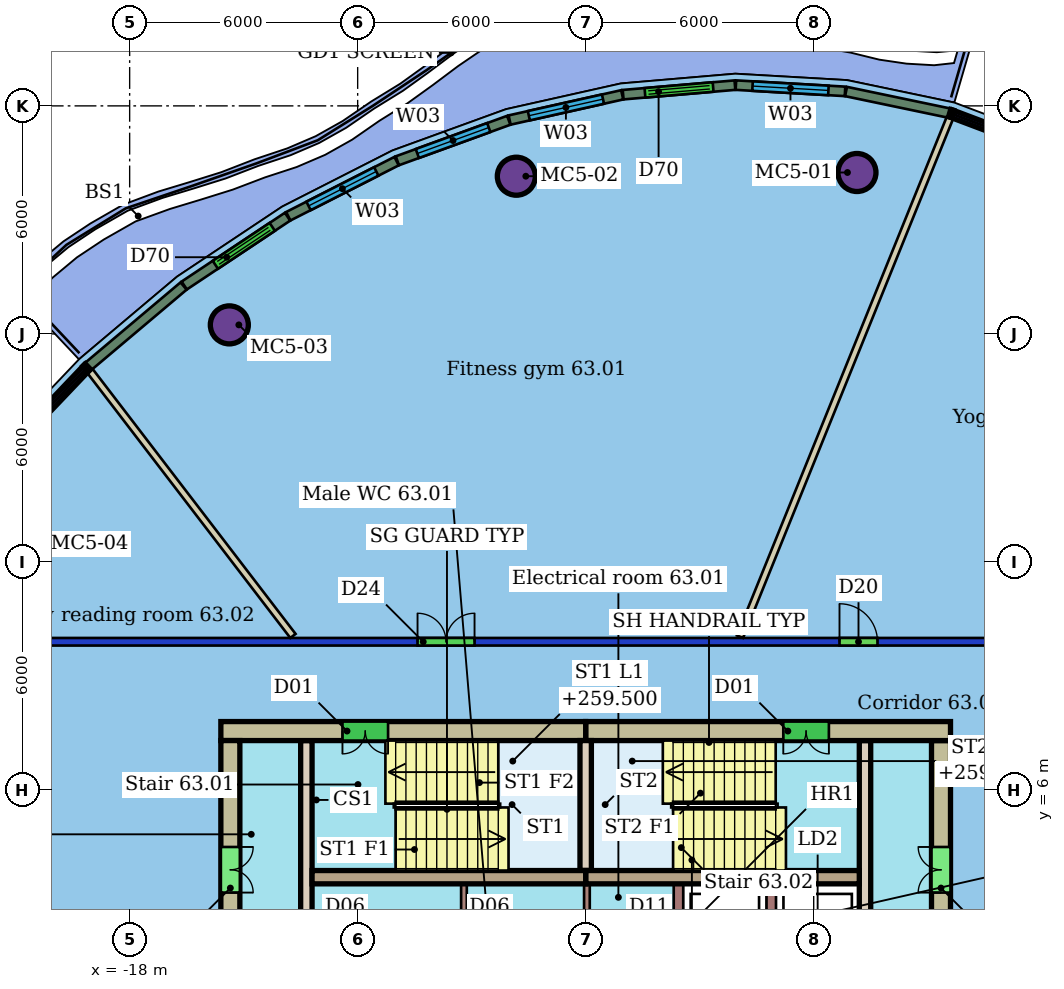
"""IFC4 building model, lengths in metres.
Left out: names, types, materials, properties, quantities, classifications, styles, units other than length and angle.
Written with IfcOpenShell. Run it as: python <this file> out.ifc"""

import sys

from ifc_helpers import new_model, si_unit, direction, frame, frame_2d, origin, origin_2d, place, context, subcontext, project, spatial, rectangle, hollow_circle, extrude, element, fill, save


model = new_model("IFC4")
c1 = context("Model", 3, precision=1e-05, world=origin(), true_north=direction((0.0, 1.0)))
c2 = subcontext(c1, "Body", "Model", "MODEL_VIEW")
j1 = project(units=[si_unit("LENGTHUNIT", "METRE"), si_unit("PLANEANGLEUNIT", "RADIAN")], contexts=[c1])
p1 = place(None, origin())
s1 = spatial("IfcSite", under=j1, at=p1, CompositionType="ELEMENT")
p2 = place(p1, origin())
s2 = spatial("IfcBuilding", under=s1, at=p2, CompositionType="ELEMENT")
p3 = place(p2, frame((0.0, 0.0, 257.7)))
s3 = spatial("IfcBuildingStorey", under=s2, at=p3, CompositionType="ELEMENT", Elevation=257.7)
for number, where, z_axis, x_axis in (
    (1, (1.138, 22.247, 0.0), (0.0, 0.0, 1.0), (1.0, 0.0, 0.0)),
    (2, (-7.825, 22.149, 0.0), (0.0, 0.0, 1.0), (1.0, 0.0, 0.0)),
    (3, (-15.377, 18.238, 0.0), (0.0, 0.0, 1.0), (1.0, 0.0, 0.0)),
):
    element("IfcColumn", number, at=place(p3, frame(where, z_axis=z_axis, x_axis=x_axis)), inside=s3, PredefinedType="COLUMN", context=c2, shape_type="SweptSolid", body=[
        extrude(hollow_circle(Radius=0.5, WallThickness=0.04, at=origin_2d()), origin(), (0.0, 0.0, 1.0), 3.45),
    ])
p4 = place(p3, frame((-20.4, 9.9, 0.0), z_axis=(0.0, 0.0, 1.0), x_axis=(1.0, 0.0, 0.0)))
e4 = element("IfcWall", 4, at=p4, inside=s3, PredefinedType="PARTITIONING", context=c2, shape_type="SweptSolid", body=[
    extrude(rectangle(XDim=28.8, YDim=0.2, at=frame_2d((14.4, 0.0))), origin(), (0.0, 0.0, 1.0), 3.1),
])
p5 = place(p4, frame((9.976, 0.0, 0.0)))
e5 = element("IfcOpeningElement", 5, at=p5, cuts=e4, PredefinedType="OPENING", context=c2, shape_type="SweptSolid", body=[
    extrude(rectangle(XDim=1.5, YDim=2.1, at=frame_2d((0.75, 1.05))), frame((0.0, 0.11, 0.0), z_axis=(0.0, -1.0, 0.0), x_axis=(1.0, 0.0, 0.0)), (0.0, 0.0, 1.0), 0.22),
])
p6 = place(p4, frame((21.079, 0.0, 0.0)))
e6 = element("IfcOpeningElement", 6, at=p6, cuts=e4, PredefinedType="OPENING", context=c2, shape_type="SweptSolid", body=[
    extrude(rectangle(XDim=1.0, YDim=2.1, at=frame_2d((0.5, 1.05))), frame((0.0, 0.11, 0.0), z_axis=(0.0, -1.0, 0.0), x_axis=(1.0, 0.0, 0.0)), (0.0, 0.0, 1.0), 0.22),
])
p7 = place(p3, frame((3.582, 23.679, 0.0), z_axis=(0.0, 0.0, 1.0), x_axis=(-0.375113366442, -0.926978943837, 0.0)))
e7 = element("IfcWall", 7, at=p7, inside=s3, PredefinedType="PARTITIONING", context=c2, shape_type="SweptSolid", body=[
    extrude(rectangle(XDim=14.721, YDim=0.175, at=frame_2d((7.361, 0.0))), origin(), (0.0, 0.0, 1.0), 3.45),
])
p8 = place(p3, frame((-19.042, 17.022, 0.0), z_axis=(0.0, 0.0, 1.0), x_axis=(0.608204407096, -0.793780447724, 0.0)))
e8 = element("IfcWall", 8, at=p8, inside=s3, PredefinedType="PARTITIONING", context=c2, shape_type="SweptSolid", body=[
    extrude(rectangle(XDim=8.779, YDim=0.175, at=frame_2d((4.389, 0.0))), origin(), (0.0, 0.0, 1.0), 3.45),
])
p9 = place(p3, frame((3.563, 23.811, 0.0), z_axis=(0.0, 0.0, 1.0), x_axis=(-0.978796787282, 0.20483371111, 0.0)))
e9 = element("IfcWall", 9, at=p9, inside=s3, PredefinedType="SOLIDWALL", context=c2, shape_type="SweptSolid", body=[
    extrude(rectangle(XDim=2.771, YDim=0.25, at=frame_2d((1.386, 0.0))), origin(), (0.0, 0.0, 1.0), 3.15),
])
p10 = place(p3, frame((0.824, 24.382, 0.0), z_axis=(0.0, 0.0, 1.0), x_axis=(-0.998361927318, 0.057214177282, 0.0)))
e10 = element("IfcWall", 10, at=p10, inside=s3, PredefinedType="SOLIDWALL", context=c2, shape_type="SweptSolid", body=[
    extrude(rectangle(XDim=2.876, YDim=0.25, at=frame_2d((1.438, 0.0))), origin(), (0.0, 0.0, 1.0), 3.15),
])
p11 = place(p10, frame((0.438, 0.0, 0.9)))
e11 = element("IfcOpeningElement", 11, at=p11, cuts=e10, PredefinedType="OPENING", context=c2, shape_type="SweptSolid", body=[
    extrude(rectangle(XDim=2.0, YDim=2.1, at=frame_2d((1.0, 1.05))), frame((0.0, 0.135, 0.0), z_axis=(0.0, -1.0, 0.0), x_axis=(1.0, 0.0, 0.0)), (0.0, 0.0, 1.0), 0.27),
])
p12 = place(p3, frame((-2.073, 24.546, 0.0), z_axis=(0.0, 0.0, 1.0), x_axis=(-0.996387742916, -0.084920349541, 0.0)))
e12 = element("IfcWall", 12, at=p12, inside=s3, PredefinedType="SOLIDWALL", context=c2, shape_type="SweptSolid", body=[
    extrude(rectangle(XDim=2.953, YDim=0.25, at=frame_2d((1.476, 0.0))), origin(), (0.0, 0.0, 1.0), 3.15),
])
p13 = place(p12, frame((0.576, 0.0, 0.0)))
e13 = element("IfcOpeningElement", 13, at=p13, cuts=e12, PredefinedType="OPENING", context=c2, shape_type="SweptSolid", body=[
    extrude(rectangle(XDim=1.8, YDim=2.4, at=frame_2d((0.9, 1.2))), frame((0.0, 0.135, 0.0), z_axis=(0.0, -1.0, 0.0), x_axis=(1.0, 0.0, 0.0)), (0.0, 0.0, 1.0), 0.27),
])
p14 = place(p3, frame((-5.039, 24.291, 0.0), z_axis=(0.0, 0.0, 1.0), x_axis=(-0.975828037389, -0.218539793734, 0.0)))
e14 = element("IfcWall", 14, at=p14, inside=s3, PredefinedType="SOLIDWALL", context=c2, shape_type="SweptSolid", body=[
    extrude(rectangle(XDim=3.035, YDim=0.25, at=frame_2d((1.518, 0.0))), origin(), (0.0, 0.0, 1.0), 3.15),
])
p15 = place(p14, frame((0.518, 0.0, 0.9)))
e15 = element("IfcOpeningElement", 15, at=p15, cuts=e14, PredefinedType="OPENING", context=c2, shape_type="SweptSolid", body=[
    extrude(rectangle(XDim=2.0, YDim=2.1, at=frame_2d((1.0, 1.05))), frame((0.0, 0.135, 0.0), z_axis=(0.0, -1.0, 0.0), x_axis=(1.0, 0.0, 0.0)), (0.0, 0.0, 1.0), 0.27),
])
p16 = place(p3, frame((-8.024, 23.621, 0.0), z_axis=(0.0, 0.0, 1.0), x_axis=(-0.93980485135, -0.341711634831, 0.0)))
e16 = element("IfcWall", 16, at=p16, inside=s3, PredefinedType="SOLIDWALL", context=c2, shape_type="SweptSolid", body=[
    extrude(rectangle(XDim=3.119, YDim=0.25, at=frame_2d((1.559, 0.0))), origin(), (0.0, 0.0, 1.0), 3.15),
])
p17 = place(p16, frame((0.559, 0.0, 0.9)))
e17 = element("IfcOpeningElement", 17, at=p17, cuts=e16, PredefinedType="OPENING", context=c2, shape_type="SweptSolid", body=[
    extrude(rectangle(XDim=2.0, YDim=2.1, at=frame_2d((1.0, 1.05))), frame((0.0, 0.135, 0.0), z_axis=(0.0, -1.0, 0.0), x_axis=(1.0, 0.0, 0.0)), (0.0, 0.0, 1.0), 0.27),
])
p18 = place(p3, frame((-10.977, 22.546, 0.0), z_axis=(0.0, 0.0, 1.0), x_axis=(-0.891165922341, -0.453677527389, 0.0)))
e18 = element("IfcWall", 18, at=p18, inside=s3, PredefinedType="SOLIDWALL", context=c2, shape_type="SweptSolid", body=[
    extrude(rectangle(XDim=3.197, YDim=0.25, at=frame_2d((1.599, 0.0))), origin(), (0.0, 0.0, 1.0), 3.15),
])
p19 = place(p18, frame((0.599, 0.0, 0.9)))
e19 = element("IfcOpeningElement", 19, at=p19, cuts=e18, PredefinedType="OPENING", context=c2, shape_type="SweptSolid", body=[
    extrude(rectangle(XDim=2.0, YDim=2.1, at=frame_2d((1.0, 1.05))), frame((0.0, 0.135, 0.0), z_axis=(0.0, -1.0, 0.0), x_axis=(1.0, 0.0, 0.0)), (0.0, 0.0, 1.0), 0.27),
])
p20 = place(p3, frame((-13.845, 21.084, 0.0), z_axis=(0.0, 0.0, 1.0), x_axis=(-0.832199778985, -0.554475903767, 0.0)))
e20 = element("IfcWall", 20, at=p20, inside=s3, PredefinedType="SOLIDWALL", context=c2, shape_type="SweptSolid", body=[
    extrude(rectangle(XDim=3.266, YDim=0.25, at=frame_2d((1.633, 0.0))), origin(), (0.0, 0.0, 1.0), 3.15),
])
p21 = place(p20, frame((0.483, 0.0, 0.0)))
e21 = element("IfcOpeningElement", 21, at=p21, cuts=e20, PredefinedType="OPENING", context=c2, shape_type="SweptSolid", body=[
    extrude(rectangle(XDim=1.8, YDim=2.4, at=frame_2d((0.9, 1.2))), frame((0.0, 0.135, 0.0), z_axis=(0.0, -1.0, 0.0), x_axis=(1.0, 0.0, 0.0)), (0.0, 0.0, 1.0), 0.27),
])
p22 = place(p3, frame((-16.581, 19.26, 0.0), z_axis=(0.0, 0.0, 1.0), x_axis=(-0.764538162014, -0.644578465995, 0.0)))
e22 = element("IfcWall", 22, at=p22, inside=s3, PredefinedType="SOLIDWALL", context=c2, shape_type="SweptSolid", body=[
    extrude(rectangle(XDim=3.277, YDim=0.25, at=frame_2d((1.638, 0.0))), origin(), (0.0, 0.0, 1.0), 3.15),
])
p23 = place(p3, frame((3.6, 7.55, 0.0), z_axis=(0.0, 0.0, 1.0), x_axis=(-1.0, 0.0, 0.0)))
e23 = element("IfcWall", 23, at=p23, inside=s3, PredefinedType="SHEAR", context=c2, shape_type="SweptSolid", body=[
    extrude(rectangle(XDim=9.6, YDim=0.5, at=frame_2d((4.8, 0.0))), origin(), (0.0, 0.0, 1.0), 3.3),
])
p24 = place(p23, frame((3.2, 0.0, 0.0)))
e24 = element("IfcOpeningElement", 24, at=p24, cuts=e23, PredefinedType="OPENING", context=c2, shape_type="SweptSolid", body=[
    extrude(rectangle(XDim=1.2, YDim=2.1, at=frame_2d((0.6, 1.05))), frame((0.0, 0.26, 0.0), z_axis=(0.0, -1.0, 0.0), x_axis=(1.0, 0.0, 0.0)), (0.0, 0.0, 1.0), 0.52),
])
p25 = place(p3, frame((-6.0, 7.55, 0.0), z_axis=(0.0, 0.0, 1.0), x_axis=(-1.0, 0.0, 0.0)))
e25 = element("IfcWall", 25, at=p25, inside=s3, PredefinedType="SHEAR", context=c2, shape_type="SweptSolid", body=[
    extrude(rectangle(XDim=9.6, YDim=0.5, at=frame_2d((4.8, 0.0))), origin(), (0.0, 0.0, 1.0), 3.3),
])
p26 = place(p25, frame((5.2, 0.0, 0.0)))
e26 = element("IfcOpeningElement", 26, at=p26, cuts=e25, PredefinedType="OPENING", context=c2, shape_type="SweptSolid", body=[
    extrude(rectangle(XDim=1.2, YDim=2.1, at=frame_2d((0.6, 1.05))), frame((0.0, 0.26, 0.0), z_axis=(0.0, -1.0, 0.0), x_axis=(1.0, 0.0, 0.0)), (0.0, 0.0, 1.0), 0.52),
])
p27 = place(p3, frame((-15.35, 7.3, 0.0), z_axis=(0.0, 0.0, 1.0), x_axis=(0.0, -1.0, 0.0)))
e27 = element("IfcWall", 27, at=p27, inside=s3, PredefinedType="SHEAR", context=c2, shape_type="SweptSolid", body=[
    extrude(rectangle(XDim=14.6, YDim=0.5, at=frame_2d((7.3, 0.0))), origin(), (0.0, 0.0, 1.0), 3.3),
])
p28 = place(p27, frame((10.6, 0.0, 0.0)))
e28 = element("IfcOpeningElement", 28, at=p28, cuts=e27, PredefinedType="OPENING", context=c2, shape_type="SweptSolid", body=[
    extrude(rectangle(XDim=1.2, YDim=2.1, at=frame_2d((0.6, 1.05))), frame((0.0, 0.26, 0.0), z_axis=(0.0, -1.0, 0.0), x_axis=(1.0, 0.0, 0.0)), (0.0, 0.0, 1.0), 0.52),
])
p29 = place(p27, frame((2.8, 0.0, 0.0)))
e29 = element("IfcOpeningElement", 29, at=p29, cuts=e27, PredefinedType="OPENING", context=c2, shape_type="SweptSolid", body=[
    extrude(rectangle(XDim=1.2, YDim=2.1, at=frame_2d((0.6, 1.05))), frame((0.0, 0.26, 0.0), z_axis=(0.0, -1.0, 0.0), x_axis=(1.0, 0.0, 0.0)), (0.0, 0.0, 1.0), 0.52),
])
p30 = place(p3, frame((3.35, -7.3, 0.0), z_axis=(0.0, 0.0, 1.0), x_axis=(0.0, 1.0, 0.0)))
e30 = element("IfcWall", 30, at=p30, inside=s3, PredefinedType="SHEAR", context=c2, shape_type="SweptSolid", body=[
    extrude(rectangle(XDim=14.6, YDim=0.5, at=frame_2d((7.3, 0.0))), origin(), (0.0, 0.0, 1.0), 3.3),
])
p31 = place(p30, frame((2.8, 0.0, 0.0)))
e31 = element("IfcOpeningElement", 31, at=p31, cuts=e30, PredefinedType="OPENING", context=c2, shape_type="SweptSolid", body=[
    extrude(rectangle(XDim=1.2, YDim=2.1, at=frame_2d((0.6, 1.05))), frame((0.0, 0.26, 0.0), z_axis=(0.0, -1.0, 0.0), x_axis=(1.0, 0.0, 0.0)), (0.0, 0.0, 1.0), 0.52),
])
p32 = place(p30, frame((10.6, 0.0, 0.0)))
e32 = element("IfcOpeningElement", 32, at=p32, cuts=e30, PredefinedType="OPENING", context=c2, shape_type="SweptSolid", body=[
    extrude(rectangle(XDim=1.2, YDim=2.1, at=frame_2d((0.6, 1.05))), frame((0.0, 0.26, 0.0), z_axis=(0.0, -1.0, 0.0), x_axis=(1.0, 0.0, 0.0)), (0.0, 0.0, 1.0), 0.52),
])
for number, where, z_axis, x_axis in (
    (33, (-13.2, 3.705, 0.0), (0.0, 0.0, 1.0), (1.0, 0.0, 0.0)),
    (34, (-6.0, 3.705, 0.0), (0.0, 0.0, 1.0), (1.0, 0.0, 0.0)),
):
    element("IfcWall", number, at=place(p3, frame(where, z_axis=z_axis, x_axis=x_axis)), inside=s3, PredefinedType="SHEAR", context=c2, shape_type="SweptSolid", body=[
        extrude(rectangle(XDim=7.2, YDim=0.35, at=frame_2d((3.6, 0.0))), origin(), (0.0, 0.0, 1.0), 3.3),
    ])
p33 = place(p3, frame((-13.35, 7.3, 0.0), z_axis=(0.0, 0.0, 1.0), x_axis=(0.0, -1.0, 0.0)))
e35 = element("IfcWall", 35, at=p33, inside=s3, PredefinedType="SHEAR", context=c2, shape_type="SweptSolid", body=[
    extrude(rectangle(XDim=14.6, YDim=0.3, at=frame_2d((7.3, 0.0))), origin(), (0.0, 0.0, 1.0), 3.3),
])
p34 = place(p33, frame((6.55, 0.0, 0.0)))
e36 = element("IfcOpeningElement", 36, at=p34, cuts=e35, PredefinedType="OPENING", context=c2, shape_type="SweptSolid", body=[
    extrude(rectangle(XDim=1.5, YDim=2.1, at=frame_2d((0.75, 1.05))), frame((0.0, 0.16, 0.0), z_axis=(0.0, -1.0, 0.0), x_axis=(1.0, 0.0, 0.0)), (0.0, 0.0, 1.0), 0.32),
])
p35 = place(p3, frame((1.35, -7.3, 0.0), z_axis=(0.0, 0.0, 1.0), x_axis=(0.0, 1.0, 0.0)))
e37 = element("IfcWall", 37, at=p35, inside=s3, PredefinedType="SHEAR", context=c2, shape_type="SweptSolid", body=[
    extrude(rectangle(XDim=14.6, YDim=0.3, at=frame_2d((7.3, 0.0))), origin(), (0.0, 0.0, 1.0), 3.3),
])
p36 = place(p35, frame((1.21, 0.0, 0.0)))
e38 = element("IfcOpeningElement", 38, at=p36, cuts=e37, PredefinedType="OPENING", context=c2, shape_type="SweptSolid", body=[
    extrude(rectangle(XDim=1.0, YDim=2.1, at=frame_2d((0.5, 1.05))), frame((0.0, 0.16, 0.0), z_axis=(0.0, -1.0, 0.0), x_axis=(1.0, 0.0, 0.0)), (0.0, 0.0, 1.0), 0.32),
])
p37 = place(p35, frame((6.55, 0.0, 0.0)))
e39 = element("IfcOpeningElement", 39, at=p37, cuts=e37, PredefinedType="OPENING", context=c2, shape_type="SweptSolid", body=[
    extrude(rectangle(XDim=1.5, YDim=2.1, at=frame_2d((0.75, 1.05))), frame((0.0, 0.16, 0.0), z_axis=(0.0, -1.0, 0.0), x_axis=(1.0, 0.0, 0.0)), (0.0, 0.0, 1.0), 0.32),
])
p38 = place(p3, frame((-6.0, 3.88, 0.0), z_axis=(0.0, 0.0, 1.0), x_axis=(0.0, 1.0, 0.0)))
e40 = element("IfcWall", 40, at=p38, inside=s3, PredefinedType="SHEAR", context=c2, shape_type="SweptSolid", body=[
    extrude(rectangle(XDim=3.42, YDim=0.3, at=frame_2d((1.71, 0.0))), origin(), (0.0, 0.0, 1.0), 3.3),
])
for number, where, z_axis, x_axis in (
    (41, (-3.558, 1.6, 0.0), (0.0, 0.0, 1.0), (0.0, 1.0, 0.0)),
    (42, (-1.117, 1.6, 0.0), (0.0, 0.0, 1.0), (0.0, 1.0, 0.0)),
):
    element("IfcWall", number, at=place(p3, frame(where, z_axis=z_axis, x_axis=x_axis)), inside=s3, PredefinedType="SHEAR", context=c2, shape_type="SweptSolid", body=[
        extrude(rectangle(XDim=1.93, YDim=0.25, at=frame_2d((0.965, 0.0))), origin(), (0.0, 0.0, 1.0), 3.3),
    ])
for number, where, z_axis, x_axis in (
    (43, (-9.203, 1.6, 0.0), (0.0, 0.0, 1.0), (0.0, 1.0, 0.0)),
    (44, (-5.967, 1.6, 0.0), (0.0, 0.0, 1.0), (0.0, 1.0, 0.0)),
):
    element("IfcWall", number, at=place(p3, frame(where, z_axis=z_axis, x_axis=x_axis)), inside=s3, PredefinedType="PARTITIONING", context=c2, shape_type="SweptSolid", body=[
        extrude(rectangle(XDim=1.93, YDim=0.15, at=frame_2d((0.965, 0.0))), origin(), (0.0, 0.0, 1.0), 3.3),
    ])
p39 = place(p5, origin())
e45 = element("IfcDoor", 45, at=p39, inside=s3, OperationType="DOUBLE_DOOR_SINGLE_SWING", PredefinedType="DOOR", context=c2, shape_type="SweptSolid", body=[
    extrude(rectangle(XDim=1.5, YDim=2.1, at=frame_2d((0.75, 1.05))), frame((0.0, 0.025, 0.0), z_axis=(0.0, -1.0, 0.0), x_axis=(1.0, 0.0, 0.0)), (0.0, 0.0, 1.0), 0.05),
])
fill(e5, e45)
p40 = place(p6, origin())
e46 = element("IfcDoor", 46, at=p40, inside=s3, OperationType="SINGLE_SWING_LEFT", PredefinedType="DOOR", context=c2, shape_type="SweptSolid", body=[
    extrude(rectangle(XDim=1.0, YDim=2.1, at=frame_2d((0.5, 1.05))), frame((0.0, 0.025, 0.0), z_axis=(0.0, -1.0, 0.0), x_axis=(1.0, 0.0, 0.0)), (0.0, 0.0, 1.0), 0.05),
])
fill(e6, e46)
p41 = place(p11, origin())
e47 = element("IfcWindow", 47, at=p41, inside=s3, PartitioningType="SINGLE_PANEL", PredefinedType="WINDOW", context=c2, shape_type="SweptSolid", body=[
    extrude(rectangle(XDim=2.0, YDim=2.1, at=frame_2d((1.0, 1.05))), frame((0.0, 0.03, 0.0), z_axis=(0.0, -1.0, 0.0), x_axis=(1.0, 0.0, 0.0)), (0.0, 0.0, 1.0), 0.06),
])
fill(e11, e47)
p42 = place(p13, origin())
e48 = element("IfcDoor", 48, at=p42, inside=s3, OperationType="DOUBLE_DOOR_SLIDING", PredefinedType="DOOR", context=c2, shape_type="SweptSolid", body=[
    extrude(rectangle(XDim=1.8, YDim=2.4, at=frame_2d((0.9, 1.2))), frame((0.0, 0.025, 0.0), z_axis=(0.0, -1.0, 0.0), x_axis=(1.0, 0.0, 0.0)), (0.0, 0.0, 1.0), 0.05),
])
fill(e13, e48)
p43 = place(p15, origin())
e49 = element("IfcWindow", 49, at=p43, inside=s3, PartitioningType="SINGLE_PANEL", PredefinedType="WINDOW", context=c2, shape_type="SweptSolid", body=[
    extrude(rectangle(XDim=2.0, YDim=2.1, at=frame_2d((1.0, 1.05))), frame((0.0, 0.03, 0.0), z_axis=(0.0, -1.0, 0.0), x_axis=(1.0, 0.0, 0.0)), (0.0, 0.0, 1.0), 0.06),
])
fill(e15, e49)
p44 = place(p17, origin())
e50 = element("IfcWindow", 50, at=p44, inside=s3, PartitioningType="SINGLE_PANEL", PredefinedType="WINDOW", context=c2, shape_type="SweptSolid", body=[
    extrude(rectangle(XDim=2.0, YDim=2.1, at=frame_2d((1.0, 1.05))), frame((0.0, 0.03, 0.0), z_axis=(0.0, -1.0, 0.0), x_axis=(1.0, 0.0, 0.0)), (0.0, 0.0, 1.0), 0.06),
])
fill(e17, e50)
p45 = place(p19, origin())
e51 = element("IfcWindow", 51, at=p45, inside=s3, PartitioningType="SINGLE_PANEL", PredefinedType="WINDOW", context=c2, shape_type="SweptSolid", body=[
    extrude(rectangle(XDim=2.0, YDim=2.1, at=frame_2d((1.0, 1.05))), frame((0.0, 0.03, 0.0), z_axis=(0.0, -1.0, 0.0), x_axis=(1.0, 0.0, 0.0)), (0.0, 0.0, 1.0), 0.06),
])
fill(e19, e51)
p46 = place(p21, origin())
e52 = element("IfcDoor", 52, at=p46, inside=s3, OperationType="DOUBLE_DOOR_SLIDING", PredefinedType="DOOR", context=c2, shape_type="SweptSolid", body=[
    extrude(rectangle(XDim=1.8, YDim=2.4, at=frame_2d((0.9, 1.2))), frame((0.0, 0.025, 0.0), z_axis=(0.0, -1.0, 0.0), x_axis=(1.0, 0.0, 0.0)), (0.0, 0.0, 1.0), 0.05),
])
fill(e21, e52)
p47 = place(p24, origin())
e53 = element("IfcDoor", 53, at=p47, inside=s3, OperationType="DOUBLE_DOOR_SINGLE_SWING", PredefinedType="NOTDEFINED", context=c2, shape_type="SweptSolid", body=[
    extrude(rectangle(XDim=1.2, YDim=2.1, at=frame_2d((0.6, 1.05))), frame((0.0, 0.025, 0.0), z_axis=(0.0, -1.0, 0.0), x_axis=(1.0, 0.0, 0.0)), (0.0, 0.0, 1.0), 0.05),
])
fill(e24, e53)
p48 = place(p26, origin())
e54 = element("IfcDoor", 54, at=p48, inside=s3, OperationType="DOUBLE_DOOR_SINGLE_SWING", PredefinedType="NOTDEFINED", context=c2, shape_type="SweptSolid", body=[
    extrude(rectangle(XDim=1.2, YDim=2.1, at=frame_2d((0.6, 1.05))), frame((0.0, 0.025, 0.0), z_axis=(0.0, -1.0, 0.0), x_axis=(1.0, 0.0, 0.0)), (0.0, 0.0, 1.0), 0.05),
])
fill(e26, e54)
p49 = place(p29, origin())
e55 = element("IfcDoor", 55, at=p49, inside=s3, OperationType="DOUBLE_DOOR_SINGLE_SWING", PredefinedType="NOTDEFINED", context=c2, shape_type="SweptSolid", body=[
    extrude(rectangle(XDim=1.2, YDim=2.1, at=frame_2d((0.6, 1.05))), frame((0.0, 0.025, 0.0), z_axis=(0.0, -1.0, 0.0), x_axis=(1.0, 0.0, 0.0)), (0.0, 0.0, 1.0), 0.05),
])
fill(e29, e55)
p50 = place(p32, origin())
e56 = element("IfcDoor", 56, at=p50, inside=s3, OperationType="DOUBLE_DOOR_SINGLE_SWING", PredefinedType="NOTDEFINED", context=c2, shape_type="SweptSolid", body=[
    extrude(rectangle(XDim=1.2, YDim=2.1, at=frame_2d((0.6, 1.05))), frame((0.0, 0.025, 0.0), z_axis=(0.0, -1.0, 0.0), x_axis=(1.0, 0.0, 0.0)), (0.0, 0.0, 1.0), 0.05),
])
fill(e32, e56)
save(model, sys.argv[1])
